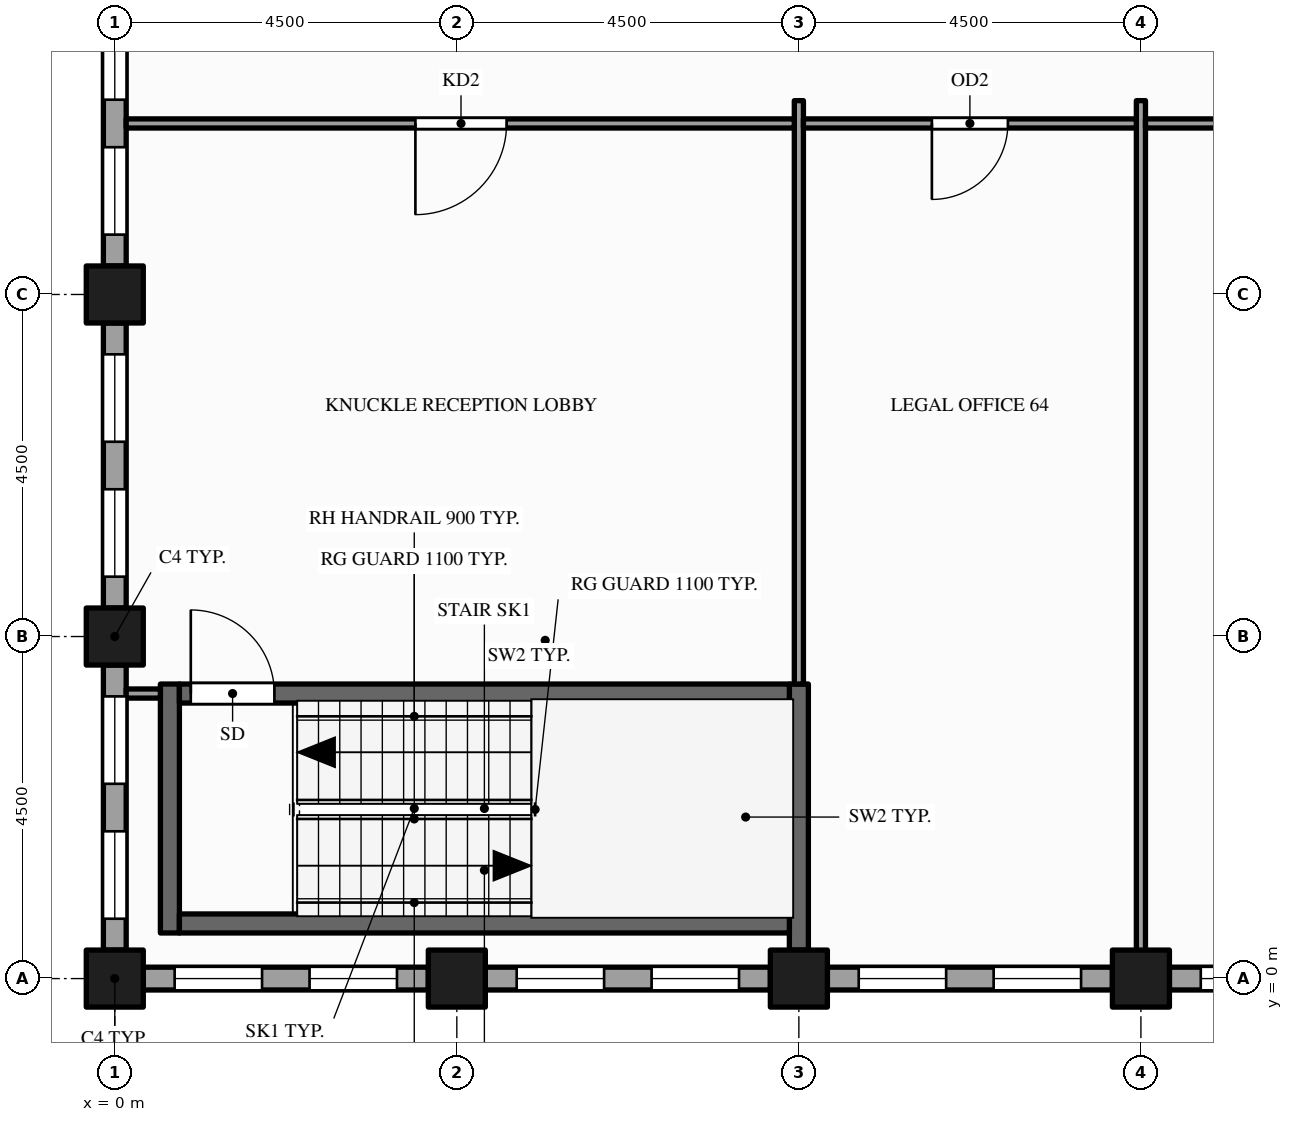
"""IFC4 building model, lengths in metres.
Left out: names, types, materials, properties, quantities, classifications, styles, units other than length and angle.
Written with IfcOpenShell. Run it as: python <this file> out.ifc"""

import sys

from ifc_helpers import new_model, si_unit, direction, frame, frame_2d, origin, origin_2d, place, context, subcontext, project, spatial, rectangle, hollow_rectangle, extrude, element, fill, save


model = new_model("IFC4")
c1 = context("Model", 3, precision=1e-05, world=origin(), true_north=direction((0.0, 1.0)))
c2 = subcontext(c1, "Body", "Model", "MODEL_VIEW")
j1 = project(units=[si_unit("LENGTHUNIT", "METRE"), si_unit("PLANEANGLEUNIT", "RADIAN")], contexts=[c1])
p1 = place(None, origin())
s1 = spatial("IfcSite", under=j1, at=p1, CompositionType="ELEMENT")
p2 = place(p1, origin())
s2 = spatial("IfcBuilding", under=s1, at=p2, CompositionType="ELEMENT")
p3 = place(p2, frame((0.0, 0.0, 207.0)))
s3 = spatial("IfcBuildingStorey", under=s2, at=p3, CompositionType="ELEMENT", Elevation=207.0)
for number, where, z_axis, x_axis in (
    (1, (0.0, 0.0, -0.15), (0.0, 0.0, 1.0), (1.0, 0.0, 0.0)),
    (2, (0.0, 4.5, -0.15), (0.0, 0.0, 1.0), (1.0, 0.0, 0.0)),
    (3, (0.0, 9.0, -0.15), (0.0, 0.0, 1.0), (1.0, 0.0, 0.0)),
    (4, (4.5, 0.0, -0.15), (0.0, 0.0, 1.0), (1.0, 0.0, 0.0)),
    (5, (9.0, 0.0, -0.15), (0.0, 0.0, 1.0), (1.0, 0.0, 0.0)),
    (6, (13.5, 0.0, -0.15), (0.0, 0.0, 1.0), (1.0, 0.0, 0.0)),
):
    element("IfcColumn", number, at=place(p3, frame(where, z_axis=z_axis, x_axis=x_axis)), inside=s3, PredefinedType="COLUMN", context=c2, shape_type="SweptSolid", body=[
        extrude(hollow_rectangle(XDim=0.75, YDim=0.75, WallThickness=0.036, at=origin_2d()), origin(), (0.0, 0.0, 1.0), 4.0),
    ])
p4 = place(p3, frame((0.0, 13.125, 0.0), z_axis=(0.0, 0.0, 1.0), x_axis=(0.0, -1.0, 0.0)))
e7 = element("IfcWall", 7, at=p4, inside=s3, PredefinedType="STANDARD", context=c2, shape_type="SweptSolid", body=[
    extrude(rectangle(XDim=3.75, YDim=0.3, at=frame_2d((1.875, 0.0))), origin(), (0.0, 0.0, 1.0), 3.157),
])
p5 = place(p4, frame((0.413, 0.0, 0.9)))
e8 = element("IfcOpeningElement", 8, at=p5, cuts=e7, PredefinedType="OPENING", context=c2, shape_type="SweptSolid", body=[
    extrude(rectangle(XDim=1.15, YDim=2.0, at=frame_2d((0.575, 1.0))), frame((0.0, 0.16, 0.0), z_axis=(0.0, -1.0, 0.0), x_axis=(1.0, 0.0, 0.0)), (0.0, 0.0, 1.0), 0.32),
])
p6 = place(p4, frame((2.188, 0.0, 0.9)))
e9 = element("IfcOpeningElement", 9, at=p6, cuts=e7, PredefinedType="OPENING", context=c2, shape_type="SweptSolid", body=[
    extrude(rectangle(XDim=1.15, YDim=2.0, at=frame_2d((0.575, 1.0))), frame((0.0, 0.16, 0.0), z_axis=(0.0, -1.0, 0.0), x_axis=(1.0, 0.0, 0.0)), (0.0, 0.0, 1.0), 0.32),
])
p7 = place(p3, frame((0.0, 8.625, 0.0), z_axis=(0.0, 0.0, 1.0), x_axis=(0.0, -1.0, 0.0)))
e10 = element("IfcWall", 10, at=p7, inside=s3, PredefinedType="STANDARD", context=c2, shape_type="SweptSolid", body=[
    extrude(rectangle(XDim=3.75, YDim=0.3, at=frame_2d((1.875, 0.0))), origin(), (0.0, 0.0, 1.0), 3.157),
])
p8 = place(p7, frame((0.413, 0.0, 0.9)))
e11 = element("IfcOpeningElement", 11, at=p8, cuts=e10, PredefinedType="OPENING", context=c2, shape_type="SweptSolid", body=[
    extrude(rectangle(XDim=1.15, YDim=2.0, at=frame_2d((0.575, 1.0))), frame((0.0, 0.16, 0.0), z_axis=(0.0, -1.0, 0.0), x_axis=(1.0, 0.0, 0.0)), (0.0, 0.0, 1.0), 0.32),
])
p9 = place(p7, frame((2.188, 0.0, 0.9)))
e12 = element("IfcOpeningElement", 12, at=p9, cuts=e10, PredefinedType="OPENING", context=c2, shape_type="SweptSolid", body=[
    extrude(rectangle(XDim=1.15, YDim=2.0, at=frame_2d((0.575, 1.0))), frame((0.0, 0.16, 0.0), z_axis=(0.0, -1.0, 0.0), x_axis=(1.0, 0.0, 0.0)), (0.0, 0.0, 1.0), 0.32),
])
p10 = place(p3, frame((0.0, 4.125, 0.0), z_axis=(0.0, 0.0, 1.0), x_axis=(0.0, -1.0, 0.0)))
e13 = element("IfcWall", 13, at=p10, inside=s3, PredefinedType="STANDARD", context=c2, shape_type="SweptSolid", body=[
    extrude(rectangle(XDim=3.75, YDim=0.3, at=frame_2d((1.875, 0.0))), origin(), (0.0, 0.0, 1.0), 3.157),
])
p11 = place(p10, frame((0.413, 0.0, 0.9)))
e14 = element("IfcOpeningElement", 14, at=p11, cuts=e13, PredefinedType="OPENING", context=c2, shape_type="SweptSolid", body=[
    extrude(rectangle(XDim=1.15, YDim=2.0, at=frame_2d((0.575, 1.0))), frame((0.0, 0.16, 0.0), z_axis=(0.0, -1.0, 0.0), x_axis=(1.0, 0.0, 0.0)), (0.0, 0.0, 1.0), 0.32),
])
p12 = place(p10, frame((2.188, 0.0, 0.9)))
e15 = element("IfcOpeningElement", 15, at=p12, cuts=e13, PredefinedType="OPENING", context=c2, shape_type="SweptSolid", body=[
    extrude(rectangle(XDim=1.15, YDim=2.0, at=frame_2d((0.575, 1.0))), frame((0.0, 0.16, 0.0), z_axis=(0.0, -1.0, 0.0), x_axis=(1.0, 0.0, 0.0)), (0.0, 0.0, 1.0), 0.32),
])
p13 = place(p3, frame((0.375, 0.0, 0.0), z_axis=(0.0, 0.0, 1.0), x_axis=(1.0, 0.0, 0.0)))
e16 = element("IfcWall", 16, at=p13, inside=s3, PredefinedType="STANDARD", context=c2, shape_type="SweptSolid", body=[
    extrude(rectangle(XDim=3.75, YDim=0.3, at=frame_2d((1.875, 0.0))), origin(), (0.0, 0.0, 1.0), 3.157),
])
p14 = place(p13, frame((0.413, 0.0, 0.9)))
e17 = element("IfcOpeningElement", 17, at=p14, cuts=e16, PredefinedType="OPENING", context=c2, shape_type="SweptSolid", body=[
    extrude(rectangle(XDim=1.15, YDim=2.0, at=frame_2d((0.575, 1.0))), frame((0.0, 0.16, 0.0), z_axis=(0.0, -1.0, 0.0), x_axis=(1.0, 0.0, 0.0)), (0.0, 0.0, 1.0), 0.32),
])
p15 = place(p13, frame((2.188, 0.0, 0.9)))
e18 = element("IfcOpeningElement", 18, at=p15, cuts=e16, PredefinedType="OPENING", context=c2, shape_type="SweptSolid", body=[
    extrude(rectangle(XDim=1.15, YDim=2.0, at=frame_2d((0.575, 1.0))), frame((0.0, 0.16, 0.0), z_axis=(0.0, -1.0, 0.0), x_axis=(1.0, 0.0, 0.0)), (0.0, 0.0, 1.0), 0.32),
])
p16 = place(p3, frame((4.875, 0.0, 0.0), z_axis=(0.0, 0.0, 1.0), x_axis=(1.0, 0.0, 0.0)))
e19 = element("IfcWall", 19, at=p16, inside=s3, PredefinedType="STANDARD", context=c2, shape_type="SweptSolid", body=[
    extrude(rectangle(XDim=3.75, YDim=0.3, at=frame_2d((1.875, 0.0))), origin(), (0.0, 0.0, 1.0), 3.157),
])
p17 = place(p16, frame((0.413, 0.0, 0.9)))
e20 = element("IfcOpeningElement", 20, at=p17, cuts=e19, PredefinedType="OPENING", context=c2, shape_type="SweptSolid", body=[
    extrude(rectangle(XDim=1.15, YDim=2.0, at=frame_2d((0.575, 1.0))), frame((0.0, 0.16, 0.0), z_axis=(0.0, -1.0, 0.0), x_axis=(1.0, 0.0, 0.0)), (0.0, 0.0, 1.0), 0.32),
])
p18 = place(p16, frame((2.188, 0.0, 0.9)))
e21 = element("IfcOpeningElement", 21, at=p18, cuts=e19, PredefinedType="OPENING", context=c2, shape_type="SweptSolid", body=[
    extrude(rectangle(XDim=1.15, YDim=2.0, at=frame_2d((0.575, 1.0))), frame((0.0, 0.16, 0.0), z_axis=(0.0, -1.0, 0.0), x_axis=(1.0, 0.0, 0.0)), (0.0, 0.0, 1.0), 0.32),
])
p19 = place(p3, frame((9.375, 0.0, 0.0), z_axis=(0.0, 0.0, 1.0), x_axis=(1.0, 0.0, 0.0)))
e22 = element("IfcWall", 22, at=p19, inside=s3, PredefinedType="STANDARD", context=c2, shape_type="SweptSolid", body=[
    extrude(rectangle(XDim=3.75, YDim=0.3, at=frame_2d((1.875, 0.0))), origin(), (0.0, 0.0, 1.0), 2.87),
])
p20 = place(p19, frame((0.413, 0.0, 0.9)))
e23 = element("IfcOpeningElement", 23, at=p20, cuts=e22, PredefinedType="OPENING", context=c2, shape_type="SweptSolid", body=[
    extrude(rectangle(XDim=1.15, YDim=1.75, at=frame_2d((0.575, 0.875))), frame((0.0, 0.16, 0.0), z_axis=(0.0, -1.0, 0.0), x_axis=(1.0, 0.0, 0.0)), (0.0, 0.0, 1.0), 0.32),
])
p21 = place(p19, frame((2.188, 0.0, 0.9)))
e24 = element("IfcOpeningElement", 24, at=p21, cuts=e22, PredefinedType="OPENING", context=c2, shape_type="SweptSolid", body=[
    extrude(rectangle(XDim=1.15, YDim=1.75, at=frame_2d((0.575, 0.875))), frame((0.0, 0.16, 0.0), z_axis=(0.0, -1.0, 0.0), x_axis=(1.0, 0.0, 0.0)), (0.0, 0.0, 1.0), 0.32),
])
p22 = place(p3, frame((13.875, 0.0, 0.0), z_axis=(0.0, 0.0, 1.0), x_axis=(1.0, 0.0, 0.0)))
e25 = element("IfcWall", 25, at=p22, inside=s3, PredefinedType="STANDARD", context=c2, shape_type="SweptSolid", body=[
    extrude(rectangle(XDim=3.75, YDim=0.3, at=frame_2d((1.875, 0.0))), origin(), (0.0, 0.0, 1.0), 2.87),
])
p23 = place(p22, frame((0.413, 0.0, 0.9)))
e26 = element("IfcOpeningElement", 26, at=p23, cuts=e25, PredefinedType="OPENING", context=c2, shape_type="SweptSolid", body=[
    extrude(rectangle(XDim=1.15, YDim=1.75, at=frame_2d((0.575, 0.875))), frame((0.0, 0.16, 0.0), z_axis=(0.0, -1.0, 0.0), x_axis=(1.0, 0.0, 0.0)), (0.0, 0.0, 1.0), 0.32),
])
p24 = place(p22, frame((2.188, 0.0, 0.9)))
e27 = element("IfcOpeningElement", 27, at=p24, cuts=e25, PredefinedType="OPENING", context=c2, shape_type="SweptSolid", body=[
    extrude(rectangle(XDim=1.15, YDim=1.75, at=frame_2d((0.575, 0.875))), frame((0.0, 0.16, 0.0), z_axis=(0.0, -1.0, 0.0), x_axis=(1.0, 0.0, 0.0)), (0.0, 0.0, 1.0), 0.32),
])
p25 = place(p3, frame((0.725, 0.6, 0.0), z_axis=(0.0, 0.0, 1.0), x_axis=(0.0, 1.0, 0.0)))
e28 = element("IfcWall", 28, at=p25, inside=s3, PredefinedType="SHEAR", context=c2, shape_type="SweptSolid", body=[
    extrude(rectangle(XDim=3.275, YDim=0.25, at=frame_2d((1.637, 0.0))), origin(), (0.0, 0.0, 1.0), 3.85),
])
p26 = place(p3, frame((9.0, 0.375, 0.0), z_axis=(0.0, 0.0, 1.0), x_axis=(0.0, 1.0, 0.0)))
e29 = element("IfcWall", 29, at=p26, inside=s3, PredefinedType="SHEAR", context=c2, shape_type="SweptSolid", body=[
    extrude(rectangle(XDim=3.5, YDim=0.25, at=frame_2d((1.75, 0.0))), origin(), (0.0, 0.0, 1.0), 3.85),
])
p27 = place(p3, frame((9.0, 3.875, 0.0), z_axis=(0.0, 0.0, 1.0), x_axis=(0.0, 1.0, 0.0)))
e30 = element("IfcWall", 30, at=p27, inside=s3, PredefinedType="PARTITIONING", context=c2, shape_type="SweptSolid", body=[
    extrude(rectangle(XDim=7.675, YDim=0.12, at=frame_2d((3.837, 0.0))), origin(), (0.0, 0.0, 1.0), 2.87),
])
p28 = place(p3, frame((13.5, 0.15, 0.0), z_axis=(0.0, 0.0, 1.0), x_axis=(0.0, 1.0, 0.0)))
e31 = element("IfcWall", 31, at=p28, inside=s3, PredefinedType="PARTITIONING", context=c2, shape_type="SweptSolid", body=[
    extrude(rectangle(XDim=11.4, YDim=0.12, at=frame_2d((5.7, 0.0))), origin(), (0.0, 0.0, 1.0), 2.87),
])
p29 = place(p3, frame((0.85, 0.725, 0.0), z_axis=(0.0, 0.0, 1.0), x_axis=(1.0, 0.0, 0.0)))
e32 = element("IfcWall", 32, at=p29, inside=s3, PredefinedType="SHEAR", context=c2, shape_type="SweptSolid", body=[
    extrude(rectangle(XDim=8.025, YDim=0.25, at=frame_2d((4.012, 0.0))), origin(), (0.0, 0.0, 1.0), 3.85),
])
p30 = place(p3, frame((0.15, 3.75, 0.0), z_axis=(0.0, 0.0, 1.0), x_axis=(1.0, 0.0, 0.0)))
e33 = element("IfcWall", 33, at=p30, inside=s3, PredefinedType="PARTITIONING", context=c2, shape_type="SweptSolid", body=[
    extrude(rectangle(XDim=0.45, YDim=0.12, at=frame_2d((0.225, 0.0))), origin(), (0.0, 0.0, 1.0), 3.85),
])
p31 = place(p3, frame((0.85, 3.75, 0.0), z_axis=(0.0, 0.0, 1.0), x_axis=(1.0, 0.0, 0.0)))
e34 = element("IfcWall", 34, at=p31, inside=s3, PredefinedType="SHEAR", context=c2, shape_type="SweptSolid", body=[
    extrude(rectangle(XDim=8.025, YDim=0.25, at=frame_2d((4.012, 0.0))), origin(), (0.0, 0.0, 1.0), 3.85),
])
p32 = place(p31, frame((0.15, 0.0, 0.0)))
e35 = element("IfcOpeningElement", 35, at=p32, cuts=e34, PredefinedType="OPENING", context=c2, shape_type="SweptSolid", body=[
    extrude(rectangle(XDim=1.1, YDim=2.1, at=frame_2d((0.55, 1.05))), frame((0.0, 0.135, 0.0), z_axis=(0.0, -1.0, 0.0), x_axis=(1.0, 0.0, 0.0)), (0.0, 0.0, 1.0), 0.27),
])
p33 = place(p3, frame((0.15, 11.25, 0.0), z_axis=(0.0, 0.0, 1.0), x_axis=(1.0, 0.0, 0.0)))
e36 = element("IfcWall", 36, at=p33, inside=s3, PredefinedType="PARTITIONING", context=c2, shape_type="SweptSolid", body=[
    extrude(rectangle(XDim=8.79, YDim=0.12, at=frame_2d((4.395, 0.0))), origin(), (0.0, 0.0, 1.0), 2.87),
])
p34 = place(p33, frame((3.805, 0.0, 0.0)))
e37 = element("IfcOpeningElement", 37, at=p34, cuts=e36, PredefinedType="OPENING", context=c2, shape_type="SweptSolid", body=[
    extrude(rectangle(XDim=1.2, YDim=2.1, at=frame_2d((0.6, 1.05))), frame((0.0, 0.07, 0.0), z_axis=(0.0, -1.0, 0.0), x_axis=(1.0, 0.0, 0.0)), (0.0, 0.0, 1.0), 0.14),
])
p35 = place(p3, frame((9.06, 11.25, 0.0), z_axis=(0.0, 0.0, 1.0), x_axis=(1.0, 0.0, 0.0)))
e38 = element("IfcWall", 38, at=p35, inside=s3, PredefinedType="PARTITIONING", context=c2, shape_type="SweptSolid", body=[
    extrude(rectangle(XDim=4.38, YDim=0.12, at=frame_2d((2.19, 0.0))), origin(), (0.0, 0.0, 1.0), 2.87),
])
p36 = place(p35, frame((1.69, 0.0, 0.0)))
e39 = element("IfcOpeningElement", 39, at=p36, cuts=e38, PredefinedType="OPENING", context=c2, shape_type="SweptSolid", body=[
    extrude(rectangle(XDim=1.0, YDim=2.1, at=frame_2d((0.5, 1.05))), frame((0.0, 0.07, 0.0), z_axis=(0.0, -1.0, 0.0), x_axis=(1.0, 0.0, 0.0)), (0.0, 0.0, 1.0), 0.14),
])
p37 = place(p3, frame((13.56, 11.25, 0.0), z_axis=(0.0, 0.0, 1.0), x_axis=(1.0, 0.0, 0.0)))
e40 = element("IfcWall", 40, at=p37, inside=s3, PredefinedType="PARTITIONING", context=c2, shape_type="SweptSolid", body=[
    extrude(rectangle(XDim=6.63, YDim=0.12, at=frame_2d((3.315, 0.0))), origin(), (0.0, 0.0, 1.0), 2.87),
])
p38 = place(p37, frame((2.815, 0.0, 0.0)))
e41 = element("IfcOpeningElement", 41, at=p38, cuts=e40, PredefinedType="OPENING", context=c2, shape_type="SweptSolid", body=[
    extrude(rectangle(XDim=1.0, YDim=2.1, at=frame_2d((0.5, 1.05))), frame((0.0, 0.07, 0.0), z_axis=(0.0, -1.0, 0.0), x_axis=(1.0, 0.0, 0.0)), (0.0, 0.0, 1.0), 0.14),
])
p39 = place(p5, origin())
e42 = element("IfcWindow", 42, at=p39, inside=s3, PartitioningType="SINGLE_PANEL", PredefinedType="WINDOW", context=c2, shape_type="SweptSolid", body=[
    extrude(rectangle(XDim=1.15, YDim=2.0, at=frame_2d((0.575, 1.0))), frame((0.0, 0.03, 0.0), z_axis=(0.0, -1.0, 0.0), x_axis=(1.0, 0.0, 0.0)), (0.0, 0.0, 1.0), 0.06),
])
fill(e8, e42)
p40 = place(p6, origin())
e43 = element("IfcWindow", 43, at=p40, inside=s3, PartitioningType="SINGLE_PANEL", PredefinedType="WINDOW", context=c2, shape_type="SweptSolid", body=[
    extrude(rectangle(XDim=1.15, YDim=2.0, at=frame_2d((0.575, 1.0))), frame((0.0, 0.03, 0.0), z_axis=(0.0, -1.0, 0.0), x_axis=(1.0, 0.0, 0.0)), (0.0, 0.0, 1.0), 0.06),
])
fill(e9, e43)
p41 = place(p8, origin())
e44 = element("IfcWindow", 44, at=p41, inside=s3, PartitioningType="SINGLE_PANEL", PredefinedType="WINDOW", context=c2, shape_type="SweptSolid", body=[
    extrude(rectangle(XDim=1.15, YDim=2.0, at=frame_2d((0.575, 1.0))), frame((0.0, 0.03, 0.0), z_axis=(0.0, -1.0, 0.0), x_axis=(1.0, 0.0, 0.0)), (0.0, 0.0, 1.0), 0.06),
])
fill(e11, e44)
p42 = place(p9, origin())
e45 = element("IfcWindow", 45, at=p42, inside=s3, PartitioningType="SINGLE_PANEL", PredefinedType="WINDOW", context=c2, shape_type="SweptSolid", body=[
    extrude(rectangle(XDim=1.15, YDim=2.0, at=frame_2d((0.575, 1.0))), frame((0.0, 0.03, 0.0), z_axis=(0.0, -1.0, 0.0), x_axis=(1.0, 0.0, 0.0)), (0.0, 0.0, 1.0), 0.06),
])
fill(e12, e45)
p43 = place(p11, origin())
e46 = element("IfcWindow", 46, at=p43, inside=s3, PartitioningType="SINGLE_PANEL", PredefinedType="WINDOW", context=c2, shape_type="SweptSolid", body=[
    extrude(rectangle(XDim=1.15, YDim=2.0, at=frame_2d((0.575, 1.0))), frame((0.0, 0.03, 0.0), z_axis=(0.0, -1.0, 0.0), x_axis=(1.0, 0.0, 0.0)), (0.0, 0.0, 1.0), 0.06),
])
fill(e14, e46)
p44 = place(p12, origin())
e47 = element("IfcWindow", 47, at=p44, inside=s3, PartitioningType="SINGLE_PANEL", PredefinedType="WINDOW", context=c2, shape_type="SweptSolid", body=[
    extrude(rectangle(XDim=1.15, YDim=2.0, at=frame_2d((0.575, 1.0))), frame((0.0, 0.03, 0.0), z_axis=(0.0, -1.0, 0.0), x_axis=(1.0, 0.0, 0.0)), (0.0, 0.0, 1.0), 0.06),
])
fill(e15, e47)
p45 = place(p14, origin())
e48 = element("IfcWindow", 48, at=p45, inside=s3, PartitioningType="SINGLE_PANEL", PredefinedType="WINDOW", context=c2, shape_type="SweptSolid", body=[
    extrude(rectangle(XDim=1.15, YDim=2.0, at=frame_2d((0.575, 1.0))), frame((0.0, 0.03, 0.0), z_axis=(0.0, -1.0, 0.0), x_axis=(1.0, 0.0, 0.0)), (0.0, 0.0, 1.0), 0.06),
])
fill(e17, e48)
p46 = place(p15, origin())
e49 = element("IfcWindow", 49, at=p46, inside=s3, PartitioningType="SINGLE_PANEL", PredefinedType="WINDOW", context=c2, shape_type="SweptSolid", body=[
    extrude(rectangle(XDim=1.15, YDim=2.0, at=frame_2d((0.575, 1.0))), frame((0.0, 0.03, 0.0), z_axis=(0.0, -1.0, 0.0), x_axis=(1.0, 0.0, 0.0)), (0.0, 0.0, 1.0), 0.06),
])
fill(e18, e49)
p47 = place(p17, origin())
e50 = element("IfcWindow", 50, at=p47, inside=s3, PartitioningType="SINGLE_PANEL", PredefinedType="WINDOW", context=c2, shape_type="SweptSolid", body=[
    extrude(rectangle(XDim=1.15, YDim=2.0, at=frame_2d((0.575, 1.0))), frame((0.0, 0.03, 0.0), z_axis=(0.0, -1.0, 0.0), x_axis=(1.0, 0.0, 0.0)), (0.0, 0.0, 1.0), 0.06),
])
fill(e20, e50)
p48 = place(p18, origin())
e51 = element("IfcWindow", 51, at=p48, inside=s3, PartitioningType="SINGLE_PANEL", PredefinedType="WINDOW", context=c2, shape_type="SweptSolid", body=[
    extrude(rectangle(XDim=1.15, YDim=2.0, at=frame_2d((0.575, 1.0))), frame((0.0, 0.03, 0.0), z_axis=(0.0, -1.0, 0.0), x_axis=(1.0, 0.0, 0.0)), (0.0, 0.0, 1.0), 0.06),
])
fill(e21, e51)
p49 = place(p20, origin())
e52 = element("IfcWindow", 52, at=p49, inside=s3, PartitioningType="SINGLE_PANEL", PredefinedType="WINDOW", context=c2, shape_type="SweptSolid", body=[
    extrude(rectangle(XDim=1.15, YDim=1.75, at=frame_2d((0.575, 0.875))), frame((0.0, 0.03, 0.0), z_axis=(0.0, -1.0, 0.0), x_axis=(1.0, 0.0, 0.0)), (0.0, 0.0, 1.0), 0.06),
])
fill(e23, e52)
p50 = place(p21, origin())
e53 = element("IfcWindow", 53, at=p50, inside=s3, PartitioningType="SINGLE_PANEL", PredefinedType="WINDOW", context=c2, shape_type="SweptSolid", body=[
    extrude(rectangle(XDim=1.15, YDim=1.75, at=frame_2d((0.575, 0.875))), frame((0.0, 0.03, 0.0), z_axis=(0.0, -1.0, 0.0), x_axis=(1.0, 0.0, 0.0)), (0.0, 0.0, 1.0), 0.06),
])
fill(e24, e53)
p51 = place(p23, origin())
e54 = element("IfcWindow", 54, at=p51, inside=s3, PartitioningType="SINGLE_PANEL", PredefinedType="WINDOW", context=c2, shape_type="SweptSolid", body=[
    extrude(rectangle(XDim=1.15, YDim=1.75, at=frame_2d((0.575, 0.875))), frame((0.0, 0.03, 0.0), z_axis=(0.0, -1.0, 0.0), x_axis=(1.0, 0.0, 0.0)), (0.0, 0.0, 1.0), 0.06),
])
fill(e26, e54)
p52 = place(p32, origin())
e55 = element("IfcDoor", 55, at=p52, inside=s3, OperationType="SINGLE_SWING_LEFT", PredefinedType="DOOR", context=c2, shape_type="SweptSolid", body=[
    extrude(rectangle(XDim=1.1, YDim=2.1, at=frame_2d((0.55, 1.05))), frame((0.0, 0.025, 0.0), z_axis=(0.0, -1.0, 0.0), x_axis=(1.0, 0.0, 0.0)), (0.0, 0.0, 1.0), 0.05),
])
fill(e35, e55)
p53 = place(p34, origin())
e56 = element("IfcDoor", 56, at=p53, inside=s3, OperationType="SINGLE_SWING_LEFT", PredefinedType="DOOR", context=c2, shape_type="SweptSolid", body=[
    extrude(rectangle(XDim=1.2, YDim=2.1, at=frame_2d((0.6, 1.05))), frame((0.0, 0.025, 0.0), z_axis=(0.0, -1.0, 0.0), x_axis=(1.0, 0.0, 0.0)), (0.0, 0.0, 1.0), 0.05),
])
fill(e37, e56)
p54 = place(p36, origin())
e57 = element("IfcDoor", 57, at=p54, inside=s3, OperationType="SINGLE_SWING_LEFT", PredefinedType="DOOR", context=c2, shape_type="SweptSolid", body=[
    extrude(rectangle(XDim=1.0, YDim=2.1, at=frame_2d((0.5, 1.05))), frame((0.0, 0.025, 0.0), z_axis=(0.0, -1.0, 0.0), x_axis=(1.0, 0.0, 0.0)), (0.0, 0.0, 1.0), 0.05),
])
fill(e39, e57)
save(model, sys.argv[1])
